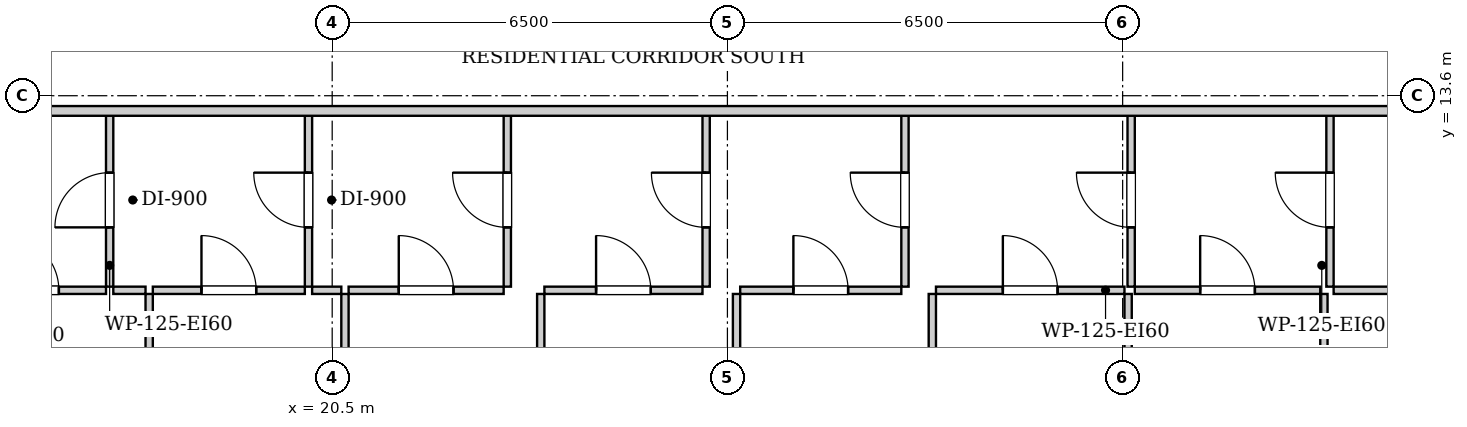
"""IFC4 building model, lengths in metres.
Left out: names, types, materials, properties, quantities, classifications, styles, units other than length and angle.
Written with IfcOpenShell. Run it as: python <this file> out.ifc"""

import sys

from ifc_helpers import new_model, si_unit, direction, frame, frame_2d, origin, place, context, subcontext, project, spatial, rectangle, extrude, element, fill, save


model = new_model("IFC4")
c1 = context("Model", 3, precision=1e-05, world=origin(), true_north=direction((0.0, 1.0)))
c2 = subcontext(c1, "Body", "Model", "MODEL_VIEW")
j1 = project(units=[si_unit("LENGTHUNIT", "METRE"), si_unit("PLANEANGLEUNIT", "RADIAN")], contexts=[c1])
p1 = place(None, origin())
s1 = spatial("IfcSite", under=j1, at=p1, CompositionType="ELEMENT")
p2 = place(p1, origin())
s2 = spatial("IfcBuilding", under=s1, at=p2, CompositionType="ELEMENT")
p3 = place(p2, frame((0.0, 0.0, 100.7)))
s3 = spatial("IfcBuildingStorey", under=s2, at=p3, CompositionType="ELEMENT", Elevation=100.7)
p4 = place(p3, frame((16.84, 10.46, 0.0), z_axis=(0.0, 0.0, 1.0), x_axis=(0.0, 1.0, 0.0)))
e1 = element("IfcWall", 1, at=p4, inside=s3, PredefinedType="PARTITIONING", context=c2, shape_type="SweptSolid", body=[
    extrude(rectangle(XDim=2.85, YDim=0.12, at=frame_2d((1.425, 0.0))), origin(), (0.0, 0.0, 1.0), 2.94),
])
p5 = place(p4, frame((0.975, 0.0, 0.0)))
e2 = element("IfcOpeningElement", 2, at=p5, cuts=e1, PredefinedType="OPENING", context=c2, shape_type="SweptSolid", body=[
    extrude(rectangle(XDim=0.9, YDim=2.05, at=frame_2d((0.45, 1.025))), frame((0.0, 0.07, 0.0), z_axis=(0.0, -1.0, 0.0), x_axis=(1.0, 0.0, 0.0)), (0.0, 0.0, 1.0), 0.14),
])
p6 = place(p3, frame((14.33, 10.4, 0.0), z_axis=(0.0, 0.0, 1.0), x_axis=(1.0, 0.0, 0.0)))
e3 = element("IfcWall", 3, at=p6, inside=s3, PredefinedType="PARTITIONING", context=c2, shape_type="SweptSolid", body=[
    extrude(rectangle(XDim=2.45, YDim=0.12, at=frame_2d((1.225, 0.0))), origin(), (0.0, 0.0, 1.0), 2.94),
])
p7 = place(p6, frame((0.775, 0.0, 0.0)))
e4 = element("IfcOpeningElement", 4, at=p7, cuts=e3, PredefinedType="OPENING", context=c2, shape_type="SweptSolid", body=[
    extrude(rectangle(XDim=0.9, YDim=2.05, at=frame_2d((0.45, 1.025))), frame((0.0, 0.07, 0.0), z_axis=(0.0, -1.0, 0.0), x_axis=(1.0, 0.0, 0.0)), (0.0, 0.0, 1.0), 0.14),
])
p8 = place(p3, frame((20.11, 10.46, 0.0), z_axis=(0.0, 0.0, 1.0), x_axis=(0.0, 1.0, 0.0)))
e5 = element("IfcWall", 5, at=p8, inside=s3, PredefinedType="PARTITIONING", context=c2, shape_type="SweptSolid", body=[
    extrude(rectangle(XDim=2.85, YDim=0.12, at=frame_2d((1.425, 0.0))), origin(), (0.0, 0.0, 1.0), 2.94),
])
p9 = place(p8, frame((0.975, 0.0, 0.0)))
e6 = element("IfcOpeningElement", 6, at=p9, cuts=e5, PredefinedType="OPENING", context=c2, shape_type="SweptSolid", body=[
    extrude(rectangle(XDim=0.9, YDim=2.05, at=frame_2d((0.45, 1.025))), frame((0.0, 0.07, 0.0), z_axis=(0.0, -1.0, 0.0), x_axis=(1.0, 0.0, 0.0)), (0.0, 0.0, 1.0), 0.14),
])
p10 = place(p3, frame((16.9, 10.4, 0.0), z_axis=(0.0, 0.0, 1.0), x_axis=(1.0, 0.0, 0.0)))
e7 = element("IfcWall", 7, at=p10, inside=s3, PredefinedType="PARTITIONING", context=c2, shape_type="SweptSolid", body=[
    extrude(rectangle(XDim=0.53, YDim=0.12, at=frame_2d((0.265, 0.0))), origin(), (0.0, 0.0, 1.0), 2.94),
])
p11 = place(p3, frame((17.55, 10.4, 0.0), z_axis=(0.0, 0.0, 1.0), x_axis=(1.0, 0.0, 0.0)))
e8 = element("IfcWall", 8, at=p11, inside=s3, PredefinedType="PARTITIONING", context=c2, shape_type="SweptSolid", body=[
    extrude(rectangle(XDim=2.5, YDim=0.12, at=frame_2d((1.25, 0.0))), origin(), (0.0, 0.0, 1.0), 2.94),
])
p12 = place(p11, frame((0.8, 0.0, 0.0)))
e9 = element("IfcOpeningElement", 9, at=p12, cuts=e8, PredefinedType="OPENING", context=c2, shape_type="SweptSolid", body=[
    extrude(rectangle(XDim=0.9, YDim=2.05, at=frame_2d((0.45, 1.025))), frame((0.0, 0.07, 0.0), z_axis=(0.0, -1.0, 0.0), x_axis=(1.0, 0.0, 0.0)), (0.0, 0.0, 1.0), 0.14),
])
p13 = place(p3, frame((23.38, 10.46, 0.0), z_axis=(0.0, 0.0, 1.0), x_axis=(0.0, 1.0, 0.0)))
e10 = element("IfcWall", 10, at=p13, inside=s3, PredefinedType="PARTITIONING", context=c2, shape_type="SweptSolid", body=[
    extrude(rectangle(XDim=2.85, YDim=0.12, at=frame_2d((1.425, 0.0))), origin(), (0.0, 0.0, 1.0), 2.94),
])
p14 = place(p13, frame((0.975, 0.0, 0.0)))
e11 = element("IfcOpeningElement", 11, at=p14, cuts=e10, PredefinedType="OPENING", context=c2, shape_type="SweptSolid", body=[
    extrude(rectangle(XDim=0.9, YDim=2.05, at=frame_2d((0.45, 1.025))), frame((0.0, 0.07, 0.0), z_axis=(0.0, -1.0, 0.0), x_axis=(1.0, 0.0, 0.0)), (0.0, 0.0, 1.0), 0.14),
])
p15 = place(p3, frame((20.17, 10.4, 0.0), z_axis=(0.0, 0.0, 1.0), x_axis=(1.0, 0.0, 0.0)))
e12 = element("IfcWall", 12, at=p15, inside=s3, PredefinedType="PARTITIONING", context=c2, shape_type="SweptSolid", body=[
    extrude(rectangle(XDim=0.48, YDim=0.12, at=frame_2d((0.24, 0.0))), origin(), (0.0, 0.0, 1.0), 2.94),
])
p16 = place(p3, frame((20.77, 10.4, 0.0), z_axis=(0.0, 0.0, 1.0), x_axis=(1.0, 0.0, 0.0)))
e13 = element("IfcWall", 13, at=p16, inside=s3, PredefinedType="PARTITIONING", context=c2, shape_type="SweptSolid", body=[
    extrude(rectangle(XDim=2.55, YDim=0.12, at=frame_2d((1.275, 0.0))), origin(), (0.0, 0.0, 1.0), 2.94),
])
p17 = place(p16, frame((0.825, 0.0, 0.0)))
e14 = element("IfcOpeningElement", 14, at=p17, cuts=e13, PredefinedType="OPENING", context=c2, shape_type="SweptSolid", body=[
    extrude(rectangle(XDim=0.9, YDim=2.05, at=frame_2d((0.45, 1.025))), frame((0.0, 0.07, 0.0), z_axis=(0.0, -1.0, 0.0), x_axis=(1.0, 0.0, 0.0)), (0.0, 0.0, 1.0), 0.14),
])
p18 = place(p3, frame((26.65, 10.46, 0.0), z_axis=(0.0, 0.0, 1.0), x_axis=(0.0, 1.0, 0.0)))
e15 = element("IfcWall", 15, at=p18, inside=s3, PredefinedType="PARTITIONING", context=c2, shape_type="SweptSolid", body=[
    extrude(rectangle(XDim=2.85, YDim=0.12, at=frame_2d((1.425, 0.0))), origin(), (0.0, 0.0, 1.0), 2.94),
])
p19 = place(p18, frame((0.975, 0.0, 0.0)))
e16 = element("IfcOpeningElement", 16, at=p19, cuts=e15, PredefinedType="OPENING", context=c2, shape_type="SweptSolid", body=[
    extrude(rectangle(XDim=0.9, YDim=2.05, at=frame_2d((0.45, 1.025))), frame((0.0, 0.07, 0.0), z_axis=(0.0, -1.0, 0.0), x_axis=(1.0, 0.0, 0.0)), (0.0, 0.0, 1.0), 0.14),
])
p20 = place(p3, frame((23.99, 10.4, 0.0), z_axis=(0.0, 0.0, 1.0), x_axis=(1.0, 0.0, 0.0)))
e17 = element("IfcWall", 17, at=p20, inside=s3, PredefinedType="PARTITIONING", context=c2, shape_type="SweptSolid", body=[
    extrude(rectangle(XDim=2.6, YDim=0.12, at=frame_2d((1.3, 0.0))), origin(), (0.0, 0.0, 1.0), 2.94),
])
p21 = place(p20, frame((0.85, 0.0, 0.0)))
e18 = element("IfcOpeningElement", 18, at=p21, cuts=e17, PredefinedType="OPENING", context=c2, shape_type="SweptSolid", body=[
    extrude(rectangle(XDim=0.9, YDim=2.05, at=frame_2d((0.45, 1.025))), frame((0.0, 0.07, 0.0), z_axis=(0.0, -1.0, 0.0), x_axis=(1.0, 0.0, 0.0)), (0.0, 0.0, 1.0), 0.14),
])
p22 = place(p3, frame((29.92, 10.46, 0.0), z_axis=(0.0, 0.0, 1.0), x_axis=(0.0, 1.0, 0.0)))
e19 = element("IfcWall", 19, at=p22, inside=s3, PredefinedType="PARTITIONING", context=c2, shape_type="SweptSolid", body=[
    extrude(rectangle(XDim=2.85, YDim=0.12, at=frame_2d((1.425, 0.0))), origin(), (0.0, 0.0, 1.0), 2.94),
])
p23 = place(p22, frame((0.975, 0.0, 0.0)))
e20 = element("IfcOpeningElement", 20, at=p23, cuts=e19, PredefinedType="OPENING", context=c2, shape_type="SweptSolid", body=[
    extrude(rectangle(XDim=0.9, YDim=2.05, at=frame_2d((0.45, 1.025))), frame((0.0, 0.07, 0.0), z_axis=(0.0, -1.0, 0.0), x_axis=(1.0, 0.0, 0.0)), (0.0, 0.0, 1.0), 0.14),
])
p24 = place(p3, frame((27.21, 10.4, 0.0), z_axis=(0.0, 0.0, 1.0), x_axis=(1.0, 0.0, 0.0)))
e21 = element("IfcWall", 21, at=p24, inside=s3, PredefinedType="PARTITIONING", context=c2, shape_type="SweptSolid", body=[
    extrude(rectangle(XDim=2.65, YDim=0.12, at=frame_2d((1.325, 0.0))), origin(), (0.0, 0.0, 1.0), 2.94),
])
p25 = place(p24, frame((0.875, 0.0, 0.0)))
e22 = element("IfcOpeningElement", 22, at=p25, cuts=e21, PredefinedType="OPENING", context=c2, shape_type="SweptSolid", body=[
    extrude(rectangle(XDim=0.9, YDim=2.05, at=frame_2d((0.45, 1.025))), frame((0.0, 0.07, 0.0), z_axis=(0.0, -1.0, 0.0), x_axis=(1.0, 0.0, 0.0)), (0.0, 0.0, 1.0), 0.14),
])
p26 = place(p3, frame((33.64, 10.46, 0.0), z_axis=(0.0, 0.0, 1.0), x_axis=(0.0, 1.0, 0.0)))
e23 = element("IfcWall", 23, at=p26, inside=s3, PredefinedType="PARTITIONING", context=c2, shape_type="SweptSolid", body=[
    extrude(rectangle(XDim=2.85, YDim=0.12, at=frame_2d((1.425, 0.0))), origin(), (0.0, 0.0, 1.0), 2.94),
])
p27 = place(p26, frame((0.975, 0.0, 0.0)))
e24 = element("IfcOpeningElement", 24, at=p27, cuts=e23, PredefinedType="OPENING", context=c2, shape_type="SweptSolid", body=[
    extrude(rectangle(XDim=0.9, YDim=2.05, at=frame_2d((0.45, 1.025))), frame((0.0, 0.07, 0.0), z_axis=(0.0, -1.0, 0.0), x_axis=(1.0, 0.0, 0.0)), (0.0, 0.0, 1.0), 0.14),
])
p28 = place(p3, frame((30.43, 10.4, 0.0), z_axis=(0.0, 0.0, 1.0), x_axis=(1.0, 0.0, 0.0)))
e25 = element("IfcWall", 25, at=p28, inside=s3, PredefinedType="PARTITIONING", context=c2, shape_type="SweptSolid", body=[
    extrude(rectangle(XDim=3.1, YDim=0.12, at=frame_2d((1.55, 0.0))), origin(), (0.0, 0.0, 1.0), 2.94),
])
p29 = place(p28, frame((1.1, 0.0, 0.0)))
e26 = element("IfcOpeningElement", 26, at=p29, cuts=e25, PredefinedType="OPENING", context=c2, shape_type="SweptSolid", body=[
    extrude(rectangle(XDim=0.9, YDim=2.05, at=frame_2d((0.45, 1.025))), frame((0.0, 0.07, 0.0), z_axis=(0.0, -1.0, 0.0), x_axis=(1.0, 0.0, 0.0)), (0.0, 0.0, 1.0), 0.14),
])
p30 = place(p3, frame((36.91, 10.46, 0.0), z_axis=(0.0, 0.0, 1.0), x_axis=(0.0, 1.0, 0.0)))
e27 = element("IfcWall", 27, at=p30, inside=s3, PredefinedType="PARTITIONING", context=c2, shape_type="SweptSolid", body=[
    extrude(rectangle(XDim=2.85, YDim=0.12, at=frame_2d((1.425, 0.0))), origin(), (0.0, 0.0, 1.0), 2.94),
])
p31 = place(p30, frame((0.975, 0.0, 0.0)))
e28 = element("IfcOpeningElement", 28, at=p31, cuts=e27, PredefinedType="OPENING", context=c2, shape_type="SweptSolid", body=[
    extrude(rectangle(XDim=0.9, YDim=2.05, at=frame_2d((0.45, 1.025))), frame((0.0, 0.07, 0.0), z_axis=(0.0, -1.0, 0.0), x_axis=(1.0, 0.0, 0.0)), (0.0, 0.0, 1.0), 0.14),
])
p32 = place(p3, frame((33.7, 10.4, 0.0), z_axis=(0.0, 0.0, 1.0), x_axis=(1.0, 0.0, 0.0)))
e29 = element("IfcWall", 29, at=p32, inside=s3, PredefinedType="PARTITIONING", context=c2, shape_type="SweptSolid", body=[
    extrude(rectangle(XDim=3.05, YDim=0.12, at=frame_2d((1.525, 0.0))), origin(), (0.0, 0.0, 1.0), 2.94),
])
p33 = place(p32, frame((1.075, 0.0, 0.0)))
e30 = element("IfcOpeningElement", 30, at=p33, cuts=e29, PredefinedType="OPENING", context=c2, shape_type="SweptSolid", body=[
    extrude(rectangle(XDim=0.9, YDim=2.05, at=frame_2d((0.45, 1.025))), frame((0.0, 0.07, 0.0), z_axis=(0.0, -1.0, 0.0), x_axis=(1.0, 0.0, 0.0)), (0.0, 0.0, 1.0), 0.14),
])
p34 = place(p3, frame((36.97, 10.4, 0.0), z_axis=(0.0, 0.0, 1.0), x_axis=(1.0, 0.0, 0.0)))
e31 = element("IfcWall", 31, at=p34, inside=s3, PredefinedType="PARTITIONING", context=c2, shape_type="SweptSolid", body=[
    extrude(rectangle(XDim=3.85, YDim=0.12, at=frame_2d((1.925, 0.0))), origin(), (0.0, 0.0, 1.0), 2.94),
])
p35 = place(p34, frame((1.475, 0.0, 0.0)))
e32 = element("IfcOpeningElement", 32, at=p35, cuts=e31, PredefinedType="OPENING", context=c2, shape_type="SweptSolid", body=[
    extrude(rectangle(XDim=0.9, YDim=2.05, at=frame_2d((0.45, 1.025))), frame((0.0, 0.07, 0.0), z_axis=(0.0, -1.0, 0.0), x_axis=(1.0, 0.0, 0.0)), (0.0, 0.0, 1.0), 0.14),
])
p36 = place(p3, frame((17.49, 0.28, 0.0), z_axis=(0.0, 0.0, 1.0), x_axis=(0.0, 1.0, 0.0)))
e33 = element("IfcWall", 33, at=p36, inside=s3, PredefinedType="PARTITIONING", context=c2, shape_type="SweptSolid", body=[
    extrude(rectangle(XDim=10.06, YDim=0.12, at=frame_2d((5.03, 0.0))), origin(), (0.0, 0.0, 1.0), 2.94),
])
p37 = place(p36, frame((4.565, 0.0, 0.0)))
e34 = element("IfcOpeningElement", 34, at=p37, cuts=e33, PredefinedType="OPENING", context=c2, shape_type="SweptSolid", body=[
    extrude(rectangle(XDim=0.9, YDim=2.05, at=frame_2d((0.45, 1.025))), frame((0.0, 0.07, 0.0), z_axis=(0.0, -1.0, 0.0), x_axis=(1.0, 0.0, 0.0)), (0.0, 0.0, 1.0), 0.14),
])
p38 = place(p3, frame((20.71, 0.28, 0.0), z_axis=(0.0, 0.0, 1.0), x_axis=(0.0, 1.0, 0.0)))
e35 = element("IfcWall", 35, at=p38, inside=s3, PredefinedType="PARTITIONING", context=c2, shape_type="SweptSolid", body=[
    extrude(rectangle(XDim=10.06, YDim=0.12, at=frame_2d((5.03, 0.0))), origin(), (0.0, 0.0, 1.0), 2.94),
])
p39 = place(p38, frame((4.565, 0.0, 0.0)))
e36 = element("IfcOpeningElement", 36, at=p39, cuts=e35, PredefinedType="OPENING", context=c2, shape_type="SweptSolid", body=[
    extrude(rectangle(XDim=0.9, YDim=2.05, at=frame_2d((0.45, 1.025))), frame((0.0, 0.07, 0.0), z_axis=(0.0, -1.0, 0.0), x_axis=(1.0, 0.0, 0.0)), (0.0, 0.0, 1.0), 0.14),
])
p40 = place(p3, frame((23.93, 0.28, 0.0), z_axis=(0.0, 0.0, 1.0), x_axis=(0.0, 1.0, 0.0)))
e37 = element("IfcWall", 37, at=p40, inside=s3, PredefinedType="PARTITIONING", context=c2, shape_type="SweptSolid", body=[
    extrude(rectangle(XDim=10.06, YDim=0.12, at=frame_2d((5.03, 0.0))), origin(), (0.0, 0.0, 1.0), 2.94),
])
p41 = place(p40, frame((4.565, 0.0, 0.0)))
e38 = element("IfcOpeningElement", 38, at=p41, cuts=e37, PredefinedType="OPENING", context=c2, shape_type="SweptSolid", body=[
    extrude(rectangle(XDim=0.9, YDim=2.05, at=frame_2d((0.45, 1.025))), frame((0.0, 0.07, 0.0), z_axis=(0.0, -1.0, 0.0), x_axis=(1.0, 0.0, 0.0)), (0.0, 0.0, 1.0), 0.14),
])
p42 = place(p3, frame((27.15, 0.28, 0.0), z_axis=(0.0, 0.0, 1.0), x_axis=(0.0, 1.0, 0.0)))
e39 = element("IfcWall", 39, at=p42, inside=s3, PredefinedType="PARTITIONING", context=c2, shape_type="SweptSolid", body=[
    extrude(rectangle(XDim=10.06, YDim=0.12, at=frame_2d((5.03, 0.0))), origin(), (0.0, 0.0, 1.0), 2.94),
])
p43 = place(p42, frame((4.565, 0.0, 0.0)))
e40 = element("IfcOpeningElement", 40, at=p43, cuts=e39, PredefinedType="OPENING", context=c2, shape_type="SweptSolid", body=[
    extrude(rectangle(XDim=0.9, YDim=2.05, at=frame_2d((0.45, 1.025))), frame((0.0, 0.07, 0.0), z_axis=(0.0, -1.0, 0.0), x_axis=(1.0, 0.0, 0.0)), (0.0, 0.0, 1.0), 0.14),
])
p44 = place(p3, frame((30.37, 0.28, 0.0), z_axis=(0.0, 0.0, 1.0), x_axis=(0.0, 1.0, 0.0)))
e41 = element("IfcWall", 41, at=p44, inside=s3, PredefinedType="PARTITIONING", context=c2, shape_type="SweptSolid", body=[
    extrude(rectangle(XDim=10.06, YDim=0.12, at=frame_2d((5.03, 0.0))), origin(), (0.0, 0.0, 1.0), 2.94),
])
p45 = place(p44, frame((4.565, 0.0, 0.0)))
e42 = element("IfcOpeningElement", 42, at=p45, cuts=e41, PredefinedType="OPENING", context=c2, shape_type="SweptSolid", body=[
    extrude(rectangle(XDim=0.9, YDim=2.05, at=frame_2d((0.45, 1.025))), frame((0.0, 0.07, 0.0), z_axis=(0.0, -1.0, 0.0), x_axis=(1.0, 0.0, 0.0)), (0.0, 0.0, 1.0), 0.14),
])
p46 = place(p3, frame((33.59, 0.28, 0.0), z_axis=(0.0, 0.0, 1.0), x_axis=(0.0, 1.0, 0.0)))
e43 = element("IfcWall", 43, at=p46, inside=s3, PredefinedType="PARTITIONING", context=c2, shape_type="SweptSolid", body=[
    extrude(rectangle(XDim=10.06, YDim=0.12, at=frame_2d((5.03, 0.0))), origin(), (0.0, 0.0, 1.0), 2.94),
])
p47 = place(p46, frame((4.565, 0.0, 0.0)))
e44 = element("IfcOpeningElement", 44, at=p47, cuts=e43, PredefinedType="OPENING", context=c2, shape_type="SweptSolid", body=[
    extrude(rectangle(XDim=0.9, YDim=2.05, at=frame_2d((0.45, 1.025))), frame((0.0, 0.07, 0.0), z_axis=(0.0, -1.0, 0.0), x_axis=(1.0, 0.0, 0.0)), (0.0, 0.0, 1.0), 0.14),
])
p48 = place(p3, frame((36.81, 0.28, 0.0), z_axis=(0.0, 0.0, 1.0), x_axis=(0.0, 1.0, 0.0)))
e45 = element("IfcWall", 45, at=p48, inside=s3, PredefinedType="PARTITIONING", context=c2, shape_type="SweptSolid", body=[
    extrude(rectangle(XDim=10.06, YDim=0.12, at=frame_2d((5.03, 0.0))), origin(), (0.0, 0.0, 1.0), 2.94),
])
p49 = place(p48, frame((4.565, 0.0, 0.0)))
e46 = element("IfcOpeningElement", 46, at=p49, cuts=e45, PredefinedType="OPENING", context=c2, shape_type="SweptSolid", body=[
    extrude(rectangle(XDim=0.9, YDim=2.05, at=frame_2d((0.45, 1.025))), frame((0.0, 0.07, 0.0), z_axis=(0.0, -1.0, 0.0), x_axis=(1.0, 0.0, 0.0)), (0.0, 0.0, 1.0), 0.14),
])
p50 = place(p3, frame((10.05, 13.35, 0.0), z_axis=(0.0, 0.0, 1.0), x_axis=(1.0, 0.0, 0.0)))
e47 = element("IfcWall", 47, at=p50, inside=s3, PredefinedType="PARTITIONING", context=c2, shape_type="SweptSolid", body=[
    extrude(rectangle(XDim=30.8, YDim=0.16, at=frame_2d((15.4, 0.0))), origin(), (0.0, 0.0, 1.0), 2.94),
])
p51 = place(p50, frame((4.165, 0.0, 0.0)))
e48 = element("IfcOpeningElement", 48, at=p51, cuts=e47, PredefinedType="OPENING", context=c2, shape_type="SweptSolid", body=[
    extrude(rectangle(XDim=0.95, YDim=2.1, at=frame_2d((0.475, 1.05))), frame((0.0, 0.09, 0.0), z_axis=(0.0, -1.0, 0.0), x_axis=(1.0, 0.0, 0.0)), (0.0, 0.0, 1.0), 0.18),
])
p52 = place(p5, origin())
e49 = element("IfcDoor", 49, at=p52, inside=s3, OperationType="SINGLE_SWING_LEFT", PredefinedType="DOOR", context=c2, shape_type="SweptSolid", body=[
    extrude(rectangle(XDim=0.9, YDim=2.05, at=frame_2d((0.45, 1.025))), frame((0.0, 0.025, 0.0), z_axis=(0.0, -1.0, 0.0), x_axis=(1.0, 0.0, 0.0)), (0.0, 0.0, 1.0), 0.05),
])
fill(e2, e49)
p53 = place(p7, origin())
e50 = element("IfcDoor", 50, at=p53, inside=s3, OperationType="SINGLE_SWING_LEFT", PredefinedType="DOOR", context=c2, shape_type="SweptSolid", body=[
    extrude(rectangle(XDim=0.9, YDim=2.05, at=frame_2d((0.45, 1.025))), frame((0.0, 0.025, 0.0), z_axis=(0.0, -1.0, 0.0), x_axis=(1.0, 0.0, 0.0)), (0.0, 0.0, 1.0), 0.05),
])
fill(e4, e50)
p54 = place(p9, origin())
e51 = element("IfcDoor", 51, at=p54, inside=s3, OperationType="SINGLE_SWING_RIGHT", PredefinedType="DOOR", context=c2, shape_type="SweptSolid", body=[
    extrude(rectangle(XDim=0.9, YDim=2.05, at=frame_2d((0.45, 1.025))), frame((0.0, 0.025, 0.0), z_axis=(0.0, -1.0, 0.0), x_axis=(1.0, 0.0, 0.0)), (0.0, 0.0, 1.0), 0.05),
])
fill(e6, e51)
p55 = place(p12, origin())
e52 = element("IfcDoor", 52, at=p55, inside=s3, OperationType="SINGLE_SWING_LEFT", PredefinedType="DOOR", context=c2, shape_type="SweptSolid", body=[
    extrude(rectangle(XDim=0.9, YDim=2.05, at=frame_2d((0.45, 1.025))), frame((0.0, 0.025, 0.0), z_axis=(0.0, -1.0, 0.0), x_axis=(1.0, 0.0, 0.0)), (0.0, 0.0, 1.0), 0.05),
])
fill(e9, e52)
p56 = place(p14, origin())
e53 = element("IfcDoor", 53, at=p56, inside=s3, OperationType="SINGLE_SWING_RIGHT", PredefinedType="DOOR", context=c2, shape_type="SweptSolid", body=[
    extrude(rectangle(XDim=0.9, YDim=2.05, at=frame_2d((0.45, 1.025))), frame((0.0, 0.025, 0.0), z_axis=(0.0, -1.0, 0.0), x_axis=(1.0, 0.0, 0.0)), (0.0, 0.0, 1.0), 0.05),
])
fill(e11, e53)
p57 = place(p17, origin())
e54 = element("IfcDoor", 54, at=p57, inside=s3, OperationType="SINGLE_SWING_LEFT", PredefinedType="DOOR", context=c2, shape_type="SweptSolid", body=[
    extrude(rectangle(XDim=0.9, YDim=2.05, at=frame_2d((0.45, 1.025))), frame((0.0, 0.025, 0.0), z_axis=(0.0, -1.0, 0.0), x_axis=(1.0, 0.0, 0.0)), (0.0, 0.0, 1.0), 0.05),
])
fill(e14, e54)
p58 = place(p19, origin())
e55 = element("IfcDoor", 55, at=p58, inside=s3, OperationType="SINGLE_SWING_RIGHT", PredefinedType="DOOR", context=c2, shape_type="SweptSolid", body=[
    extrude(rectangle(XDim=0.9, YDim=2.05, at=frame_2d((0.45, 1.025))), frame((0.0, 0.025, 0.0), z_axis=(0.0, -1.0, 0.0), x_axis=(1.0, 0.0, 0.0)), (0.0, 0.0, 1.0), 0.05),
])
fill(e16, e55)
p59 = place(p21, origin())
e56 = element("IfcDoor", 56, at=p59, inside=s3, OperationType="SINGLE_SWING_LEFT", PredefinedType="DOOR", context=c2, shape_type="SweptSolid", body=[
    extrude(rectangle(XDim=0.9, YDim=2.05, at=frame_2d((0.45, 1.025))), frame((0.0, 0.025, 0.0), z_axis=(0.0, -1.0, 0.0), x_axis=(1.0, 0.0, 0.0)), (0.0, 0.0, 1.0), 0.05),
])
fill(e18, e56)
p60 = place(p23, origin())
e57 = element("IfcDoor", 57, at=p60, inside=s3, OperationType="SINGLE_SWING_RIGHT", PredefinedType="DOOR", context=c2, shape_type="SweptSolid", body=[
    extrude(rectangle(XDim=0.9, YDim=2.05, at=frame_2d((0.45, 1.025))), frame((0.0, 0.025, 0.0), z_axis=(0.0, -1.0, 0.0), x_axis=(1.0, 0.0, 0.0)), (0.0, 0.0, 1.0), 0.05),
])
fill(e20, e57)
p61 = place(p25, origin())
e58 = element("IfcDoor", 58, at=p61, inside=s3, OperationType="SINGLE_SWING_LEFT", PredefinedType="DOOR", context=c2, shape_type="SweptSolid", body=[
    extrude(rectangle(XDim=0.9, YDim=2.05, at=frame_2d((0.45, 1.025))), frame((0.0, 0.025, 0.0), z_axis=(0.0, -1.0, 0.0), x_axis=(1.0, 0.0, 0.0)), (0.0, 0.0, 1.0), 0.05),
])
fill(e22, e58)
p62 = place(p27, origin())
e59 = element("IfcDoor", 59, at=p62, inside=s3, OperationType="SINGLE_SWING_RIGHT", PredefinedType="DOOR", context=c2, shape_type="SweptSolid", body=[
    extrude(rectangle(XDim=0.9, YDim=2.05, at=frame_2d((0.45, 1.025))), frame((0.0, 0.025, 0.0), z_axis=(0.0, -1.0, 0.0), x_axis=(1.0, 0.0, 0.0)), (0.0, 0.0, 1.0), 0.05),
])
fill(e24, e59)
p63 = place(p29, origin())
e60 = element("IfcDoor", 60, at=p63, inside=s3, OperationType="SINGLE_SWING_LEFT", PredefinedType="DOOR", context=c2, shape_type="SweptSolid", body=[
    extrude(rectangle(XDim=0.9, YDim=2.05, at=frame_2d((0.45, 1.025))), frame((0.0, 0.025, 0.0), z_axis=(0.0, -1.0, 0.0), x_axis=(1.0, 0.0, 0.0)), (0.0, 0.0, 1.0), 0.05),
])
fill(e26, e60)
p64 = place(p31, origin())
e61 = element("IfcDoor", 61, at=p64, inside=s3, OperationType="SINGLE_SWING_RIGHT", PredefinedType="DOOR", context=c2, shape_type="SweptSolid", body=[
    extrude(rectangle(XDim=0.9, YDim=2.05, at=frame_2d((0.45, 1.025))), frame((0.0, 0.025, 0.0), z_axis=(0.0, -1.0, 0.0), x_axis=(1.0, 0.0, 0.0)), (0.0, 0.0, 1.0), 0.05),
])
fill(e28, e61)
p65 = place(p33, origin())
e62 = element("IfcDoor", 62, at=p65, inside=s3, OperationType="SINGLE_SWING_LEFT", PredefinedType="DOOR", context=c2, shape_type="SweptSolid", body=[
    extrude(rectangle(XDim=0.9, YDim=2.05, at=frame_2d((0.45, 1.025))), frame((0.0, 0.025, 0.0), z_axis=(0.0, -1.0, 0.0), x_axis=(1.0, 0.0, 0.0)), (0.0, 0.0, 1.0), 0.05),
])
fill(e30, e62)
save(model, sys.argv[1])
